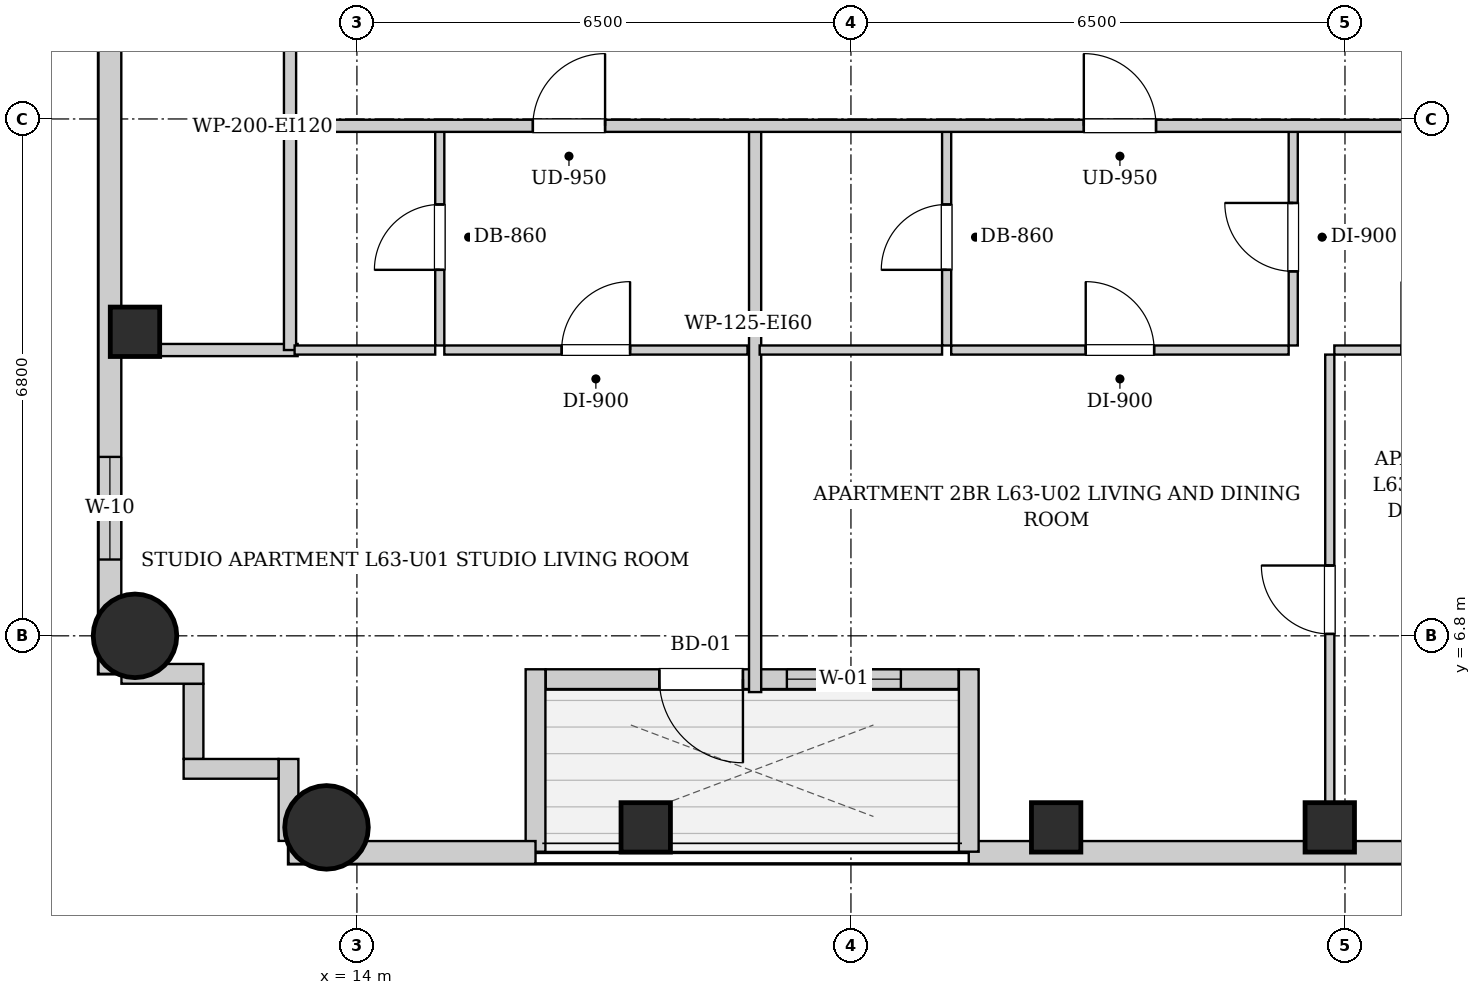
"""IFC4 building model, lengths in metres.
Left out: names, types, materials, properties, quantities, classifications, styles, units other than length and angle.
Written with IfcOpenShell. Run it as: python <this file> out.ifc"""

import sys

from ifc_helpers import new_model, si_unit, direction, frame, frame_2d, origin, origin_2d, place, context, subcontext, project, spatial, rectangle, circle, extrude, element, fill, save


model = new_model("IFC4")
c1 = context("Model", 3, precision=1e-05, world=origin(), true_north=direction((0.0, 1.0)))
c2 = subcontext(c1, "Body", "Model", "MODEL_VIEW")
j1 = project(units=[si_unit("LENGTHUNIT", "METRE"), si_unit("PLANEANGLEUNIT", "RADIAN")], contexts=[c1])
p1 = place(None, origin())
s1 = spatial("IfcSite", under=j1, at=p1, CompositionType="ELEMENT")
p2 = place(p1, origin())
s2 = spatial("IfcBuilding", under=s1, at=p2, CompositionType="ELEMENT")
p3 = place(p2, frame((0.0, 0.0, 217.3)))
s3 = spatial("IfcBuildingStorey", under=s2, at=p3, CompositionType="ELEMENT", Elevation=217.3)
p4 = place(p3, frame((13.6, 4.28, 0.0), z_axis=(0.0, 0.0, 1.0), x_axis=(1.0, 0.0, 0.0)))
e1 = element("IfcColumn", 1, at=p4, inside=s3, PredefinedType="COLUMN", context=c2, shape_type="SweptSolid", body=[
    extrude(circle(Radius=0.55, at=origin_2d()), origin(), (0.0, 0.0, 1.0), 3.4),
])
for number, where, z_axis, x_axis in (
    (2, (17.8, 4.28, 0.0), (0.0, 0.0, 1.0), (1.0, 0.0, 0.0)),
    (3, (23.2, 4.28, 0.0), (0.0, 0.0, 1.0), (1.0, 0.0, 0.0)),
    (4, (26.8, 4.28, 0.0), (0.0, 0.0, 1.0), (1.0, 0.0, 0.0)),
):
    element("IfcColumn", number, at=place(p3, frame(where, z_axis=z_axis, x_axis=x_axis)), inside=s3, PredefinedType="COLUMN", context=c2, shape_type="SweptSolid", body=[
        extrude(rectangle(XDim=0.65, YDim=0.65, at=origin_2d()), origin(), (0.0, 0.0, 1.0), 3.4),
    ])
p5 = place(p3, frame((11.08, 6.8, 0.0), z_axis=(0.0, 0.0, 1.0), x_axis=(1.0, 0.0, 0.0)))
e5 = element("IfcColumn", 5, at=p5, inside=s3, PredefinedType="COLUMN", context=c2, shape_type="SweptSolid", body=[
    extrude(circle(Radius=0.55, at=origin_2d()), origin(), (0.0, 0.0, 1.0), 3.4),
])
p6 = place(p3, frame((11.08, 10.8, 0.0), z_axis=(0.0, 0.0, 1.0), x_axis=(1.0, 0.0, 0.0)))
e6 = element("IfcColumn", 6, at=p6, inside=s3, PredefinedType="COLUMN", context=c2, shape_type="SweptSolid", body=[
    extrude(rectangle(XDim=0.65, YDim=0.65, at=origin_2d()), origin(), (0.0, 0.0, 1.0), 3.4),
])
p7 = place(p3, frame((37.8, 3.95, 0.0), z_axis=(0.0, 0.0, 1.0), x_axis=(-1.0, 0.0, 0.0)))
e7 = element("IfcWall", 7, at=p7, inside=s3, PredefinedType="SOLIDWALL", context=c2, shape_type="SweptSolid", body=[
    extrude(rectangle(XDim=15.75, YDim=0.3, at=frame_2d((7.875, 0.0))), origin(), (0.0, 0.0, 1.0), 3.14),
])
p8 = place(p7, frame((8.335, 0.0, 0.55)))
e8 = element("IfcOpeningElement", 8, at=p8, cuts=e7, PredefinedType="OPENING", context=c2, shape_type="SweptSolid", body=[
    extrude(rectangle(XDim=1.35, YDim=1.2, at=frame_2d((0.675, 0.6))), frame((0.0, 0.16, 0.0), z_axis=(0.0, -1.0, 0.0), x_axis=(1.0, 0.0, 0.0)), (0.0, 0.0, 1.0), 0.32),
])
p9 = place(p7, frame((5.085, 0.0, 0.55)))
e9 = element("IfcOpeningElement", 9, at=p9, cuts=e7, PredefinedType="OPENING", context=c2, shape_type="SweptSolid", body=[
    extrude(rectangle(XDim=1.35, YDim=1.2, at=frame_2d((0.675, 0.6))), frame((0.0, 0.16, 0.0), z_axis=(0.0, -1.0, 0.0), x_axis=(1.0, 0.0, 0.0)), (0.0, 0.0, 1.0), 0.32),
])
p10 = place(p3, frame((22.05, 3.96, 0.0), z_axis=(0.0, 0.0, 1.0), x_axis=(0.0, 1.0, 0.0)))
e10 = element("IfcWall", 10, at=p10, inside=s3, PredefinedType="SOLIDWALL", context=c2, shape_type="SweptSolid", body=[
    extrude(rectangle(XDim=2.4, YDim=0.26, at=frame_2d((1.2, 0.0))), origin(), (0.0, 0.0, 1.0), 3.14),
])
p11 = place(p3, frame((21.916, 6.23, 0.0), z_axis=(0.0, 0.0, 1.0), x_axis=(-1.0, 0.0, 0.0)))
e11 = element("IfcWall", 11, at=p11, inside=s3, PredefinedType="SOLIDWALL", context=c2, shape_type="SweptSolid", body=[
    extrude(rectangle(XDim=5.432, YDim=0.26, at=frame_2d((2.716, 0.0))), origin(), (0.0, 0.0, 1.0), 3.14),
])
p12 = place(p11, frame((2.837, 0.0, 0.0)))
e12 = element("IfcOpeningElement", 12, at=p12, cuts=e11, PredefinedType="OPENING", context=c2, shape_type="SweptSolid", body=[
    extrude(rectangle(XDim=1.1, YDim=2.0, at=frame_2d((0.55, 1.0))), frame((0.0, 0.14, 0.0), z_axis=(0.0, -1.0, 0.0), x_axis=(1.0, 0.0, 0.0)), (0.0, 0.0, 1.0), 0.28),
])
p13 = place(p11, frame((0.759, 0.0, 0.85)))
e13 = element("IfcOpeningElement", 13, at=p13, cuts=e11, PredefinedType="OPENING", context=c2, shape_type="SweptSolid", body=[
    extrude(rectangle(XDim=1.5, YDim=1.85, at=frame_2d((0.75, 0.925))), frame((0.0, 0.14, 0.0), z_axis=(0.0, -1.0, 0.0), x_axis=(1.0, 0.0, 0.0)), (0.0, 0.0, 1.0), 0.28),
])
p14 = place(p3, frame((16.35, 6.36, 0.0), z_axis=(0.0, 0.0, 1.0), x_axis=(0.0, -1.0, 0.0)))
e14 = element("IfcWall", 14, at=p14, inside=s3, PredefinedType="SOLIDWALL", context=c2, shape_type="SweptSolid", body=[
    extrude(rectangle(XDim=2.4, YDim=0.26, at=frame_2d((1.2, 0.0))), origin(), (0.0, 0.0, 1.0), 3.14),
])
p15 = place(p3, frame((16.35, 3.95, 0.0), z_axis=(0.0, 0.0, 1.0), x_axis=(-1.0, 0.0, 0.0)))
e15 = element("IfcWall", 15, at=p15, inside=s3, PredefinedType="SOLIDWALL", context=c2, shape_type="SweptSolid", body=[
    extrude(rectangle(XDim=3.25, YDim=0.3, at=frame_2d((1.625, 0.0))), origin(), (0.0, 0.0, 1.0), 3.14),
])
p16 = place(p3, frame((10.75, 6.3, 0.0), z_axis=(0.0, 0.0, 1.0), x_axis=(0.0, 1.0, 0.0)))
e16 = element("IfcWall", 16, at=p16, inside=s3, PredefinedType="SOLIDWALL", context=c2, shape_type="SweptSolid", body=[
    extrude(rectangle(XDim=31.4, YDim=0.3, at=frame_2d((15.7, 0.0))), origin(), (0.0, 0.0, 1.0), 3.14),
])
p17 = place(p16, frame((1.504, 0.0, 0.55)))
e17 = element("IfcOpeningElement", 17, at=p17, cuts=e16, PredefinedType="OPENING", context=c2, shape_type="SweptSolid", body=[
    extrude(rectangle(XDim=1.35, YDim=1.2, at=frame_2d((0.675, 0.6))), frame((0.0, 0.16, 0.0), z_axis=(0.0, -1.0, 0.0), x_axis=(1.0, 0.0, 0.0)), (0.0, 0.0, 1.0), 0.32),
])
p18 = place(p16, frame((28.546, 0.0, 0.55)))
e18 = element("IfcOpeningElement", 18, at=p18, cuts=e16, PredefinedType="OPENING", context=c2, shape_type="SweptSolid", body=[
    extrude(rectangle(XDim=1.35, YDim=1.2, at=frame_2d((0.675, 0.6))), frame((0.0, 0.16, 0.0), z_axis=(0.0, -1.0, 0.0), x_axis=(1.0, 0.0, 0.0)), (0.0, 0.0, 1.0), 0.32),
])
p19 = place(p16, frame((10.367, 0.0, 0.55)))
e19 = element("IfcOpeningElement", 19, at=p19, cuts=e16, PredefinedType="OPENING", context=c2, shape_type="SweptSolid", body=[
    extrude(rectangle(XDim=1.35, YDim=1.2, at=frame_2d((0.675, 0.6))), frame((0.0, 0.16, 0.0), z_axis=(0.0, -1.0, 0.0), x_axis=(1.0, 0.0, 0.0)), (0.0, 0.0, 1.0), 0.32),
])
p20 = place(p16, frame((19.683, 0.0, 0.55)))
e20 = element("IfcOpeningElement", 20, at=p20, cuts=e16, PredefinedType="OPENING", context=c2, shape_type="SweptSolid", body=[
    extrude(rectangle(XDim=1.35, YDim=1.2, at=frame_2d((0.675, 0.6))), frame((0.0, 0.16, 0.0), z_axis=(0.0, -1.0, 0.0), x_axis=(1.0, 0.0, 0.0)), (0.0, 0.0, 1.0), 0.32),
])
p21 = place(p3, frame((13.1, 4.102, 0.0), z_axis=(0.0, 0.0, 1.0), x_axis=(0.0, 1.0, 0.0)))
e21 = element("IfcWall", 21, at=p21, inside=s3, PredefinedType="SOLIDWALL", context=c2, shape_type="SweptSolid", body=[
    extrude(rectangle(XDim=1.078, YDim=0.26, at=frame_2d((0.539, 0.0))), origin(), (0.0, 0.0, 1.0), 3.14),
])
p22 = place(p3, frame((12.968, 5.05, 0.0), z_axis=(0.0, 0.0, 1.0), x_axis=(-1.0, 0.0, 0.0)))
e22 = element("IfcWall", 22, at=p22, inside=s3, PredefinedType="SOLIDWALL", context=c2, shape_type="SweptSolid", body=[
    extrude(rectangle(XDim=1.248, YDim=0.26, at=frame_2d((0.624, 0.0))), origin(), (0.0, 0.0, 1.0), 3.14),
])
p23 = place(p3, frame((11.85, 5.182, 0.0), z_axis=(0.0, 0.0, 1.0), x_axis=(0.0, 1.0, 0.0)))
e23 = element("IfcWall", 23, at=p23, inside=s3, PredefinedType="SOLIDWALL", context=c2, shape_type="SweptSolid", body=[
    extrude(rectangle(XDim=0.986, YDim=0.26, at=frame_2d((0.493, 0.0))), origin(), (0.0, 0.0, 1.0), 3.14),
])
p24 = place(p3, frame((11.98, 6.3, 0.0), z_axis=(0.0, 0.0, 1.0), x_axis=(-1.0, 0.0, 0.0)))
e24 = element("IfcWall", 24, at=p24, inside=s3, PredefinedType="SOLIDWALL", context=c2, shape_type="SweptSolid", body=[
    extrude(rectangle(XDim=1.078, YDim=0.26, at=frame_2d((0.539, 0.0))), origin(), (0.0, 0.0, 1.0), 3.14),
])
p25 = place(p3, frame((13.12, 13.51, 0.0), z_axis=(0.0, 0.0, 1.0), x_axis=(0.0, 1.0, 0.0)))
e25 = element("IfcWall", 25, at=p25, inside=s3, PredefinedType="PARTITIONING", context=c2, shape_type="SweptSolid", body=[
    extrude(rectangle(XDim=1.58, YDim=0.16, at=frame_2d((0.79, 0.0))), origin(), (0.0, 0.0, 1.0), 3.14),
])
p26 = place(p3, frame((10.88, 10.56, 0.0), z_axis=(0.0, 0.0, 1.0), x_axis=(1.0, 0.0, 0.0)))
e26 = element("IfcWall", 26, at=p26, inside=s3, PredefinedType="PARTITIONING", context=c2, shape_type="SweptSolid", body=[
    extrude(rectangle(XDim=2.34, YDim=0.16, at=frame_2d((1.17, 0.0))), origin(), (0.0, 0.0, 1.0), 3.14),
])
p27 = place(p3, frame((13.12, 10.56, 0.0), z_axis=(0.0, 0.0, 1.0), x_axis=(0.0, 1.0, 0.0)))
e27 = element("IfcWall", 27, at=p27, inside=s3, PredefinedType="PARTITIONING", context=c2, shape_type="SweptSolid", body=[
    extrude(rectangle(XDim=2.91, YDim=0.16, at=frame_2d((1.455, 0.0))), origin(), (0.0, 0.0, 1.0), 3.14),
])
p28 = place(p3, frame((15.09, 10.62, 0.0), z_axis=(0.0, 0.0, 1.0), x_axis=(0.0, 1.0, 0.0)))
e28 = element("IfcWall", 28, at=p28, inside=s3, PredefinedType="PARTITIONING", context=c2, shape_type="SweptSolid", body=[
    extrude(rectangle(XDim=2.85, YDim=0.12, at=frame_2d((1.425, 0.0))), origin(), (0.0, 0.0, 1.0), 3.14),
])
p29 = place(p28, frame((0.995, 0.0, 0.0)))
e29 = element("IfcOpeningElement", 29, at=p29, cuts=e28, PredefinedType="OPENING", context=c2, shape_type="SweptSolid", body=[
    extrude(rectangle(XDim=0.86, YDim=2.05, at=frame_2d((0.43, 1.025))), frame((0.0, 0.07, 0.0), z_axis=(0.0, -1.0, 0.0), x_axis=(1.0, 0.0, 0.0)), (0.0, 0.0, 1.0), 0.14),
])
p30 = place(p3, frame((13.18, 10.56, 0.0), z_axis=(0.0, 0.0, 1.0), x_axis=(1.0, 0.0, 0.0)))
e30 = element("IfcWall", 30, at=p30, inside=s3, PredefinedType="PARTITIONING", context=c2, shape_type="SweptSolid", body=[
    extrude(rectangle(XDim=1.85, YDim=0.12, at=frame_2d((0.925, 0.0))), origin(), (0.0, 0.0, 1.0), 3.14),
])
p31 = place(p3, frame((15.15, 10.56, 0.0), z_axis=(0.0, 0.0, 1.0), x_axis=(1.0, 0.0, 0.0)))
e31 = element("IfcWall", 31, at=p31, inside=s3, PredefinedType="PARTITIONING", context=c2, shape_type="SweptSolid", body=[
    extrude(rectangle(XDim=3.989, YDim=0.12, at=frame_2d((1.995, 0.0))), origin(), (0.0, 0.0, 1.0), 3.14),
])
p32 = place(p31, frame((1.544, 0.0, 0.0)))
e32 = element("IfcOpeningElement", 32, at=p32, cuts=e31, PredefinedType="OPENING", context=c2, shape_type="SweptSolid", body=[
    extrude(rectangle(XDim=0.9, YDim=2.05, at=frame_2d((0.45, 1.025))), frame((0.0, 0.07, 0.0), z_axis=(0.0, -1.0, 0.0), x_axis=(1.0, 0.0, 0.0)), (0.0, 0.0, 1.0), 0.14),
])
p33 = place(p3, frame((19.239, 6.06, 0.0), z_axis=(0.0, 0.0, 1.0), x_axis=(0.0, 1.0, 0.0)))
e33 = element("IfcWall", 33, at=p33, inside=s3, PredefinedType="PARTITIONING", context=c2, shape_type="SweptSolid", body=[
    extrude(rectangle(XDim=7.41, YDim=0.16, at=frame_2d((3.705, 0.0))), origin(), (0.0, 0.0, 1.0), 3.14),
])
p34 = place(p3, frame((21.759, 10.62, 0.0), z_axis=(0.0, 0.0, 1.0), x_axis=(0.0, 1.0, 0.0)))
e34 = element("IfcWall", 34, at=p34, inside=s3, PredefinedType="PARTITIONING", context=c2, shape_type="SweptSolid", body=[
    extrude(rectangle(XDim=2.85, YDim=0.12, at=frame_2d((1.425, 0.0))), origin(), (0.0, 0.0, 1.0), 3.14),
])
p35 = place(p34, frame((0.995, 0.0, 0.0)))
e35 = element("IfcOpeningElement", 35, at=p35, cuts=e34, PredefinedType="OPENING", context=c2, shape_type="SweptSolid", body=[
    extrude(rectangle(XDim=0.86, YDim=2.05, at=frame_2d((0.43, 1.025))), frame((0.0, 0.07, 0.0), z_axis=(0.0, -1.0, 0.0), x_axis=(1.0, 0.0, 0.0)), (0.0, 0.0, 1.0), 0.14),
])
p36 = place(p3, frame((19.299, 10.56, 0.0), z_axis=(0.0, 0.0, 1.0), x_axis=(1.0, 0.0, 0.0)))
e36 = element("IfcWall", 36, at=p36, inside=s3, PredefinedType="PARTITIONING", context=c2, shape_type="SweptSolid", body=[
    extrude(rectangle(XDim=2.4, YDim=0.12, at=frame_2d((1.2, 0.0))), origin(), (0.0, 0.0, 1.0), 3.14),
])
p37 = place(p3, frame((26.319, 10.62, 0.0), z_axis=(0.0, 0.0, 1.0), x_axis=(0.0, 1.0, 0.0)))
e37 = element("IfcWall", 37, at=p37, inside=s3, PredefinedType="PARTITIONING", context=c2, shape_type="SweptSolid", body=[
    extrude(rectangle(XDim=2.85, YDim=0.12, at=frame_2d((1.425, 0.0))), origin(), (0.0, 0.0, 1.0), 3.14),
])
p38 = place(p37, frame((0.975, 0.0, 0.0)))
e38 = element("IfcOpeningElement", 38, at=p38, cuts=e37, PredefinedType="OPENING", context=c2, shape_type="SweptSolid", body=[
    extrude(rectangle(XDim=0.9, YDim=2.05, at=frame_2d((0.45, 1.025))), frame((0.0, 0.07, 0.0), z_axis=(0.0, -1.0, 0.0), x_axis=(1.0, 0.0, 0.0)), (0.0, 0.0, 1.0), 0.14),
])
p39 = place(p3, frame((21.819, 10.56, 0.0), z_axis=(0.0, 0.0, 1.0), x_axis=(1.0, 0.0, 0.0)))
e39 = element("IfcWall", 39, at=p39, inside=s3, PredefinedType="PARTITIONING", context=c2, shape_type="SweptSolid", body=[
    extrude(rectangle(XDim=4.44, YDim=0.12, at=frame_2d((2.22, 0.0))), origin(), (0.0, 0.0, 1.0), 3.14),
])
p40 = place(p39, frame((1.77, 0.0, 0.0)))
e40 = element("IfcOpeningElement", 40, at=p40, cuts=e39, PredefinedType="OPENING", context=c2, shape_type="SweptSolid", body=[
    extrude(rectangle(XDim=0.9, YDim=2.05, at=frame_2d((0.45, 1.025))), frame((0.0, 0.07, 0.0), z_axis=(0.0, -1.0, 0.0), x_axis=(1.0, 0.0, 0.0)), (0.0, 0.0, 1.0), 0.14),
])
p41 = place(p3, frame((26.86, 10.56, 0.0), z_axis=(0.0, 0.0, 1.0), x_axis=(1.0, 0.0, 0.0)))
e41 = element("IfcWall", 41, at=p41, inside=s3, PredefinedType="PARTITIONING", context=c2, shape_type="SweptSolid", body=[
    extrude(rectangle(XDim=2.669, YDim=0.12, at=frame_2d((1.334, 0.0))), origin(), (0.0, 0.0, 1.0), 3.14),
])
p42 = place(p41, frame((0.884, 0.0, 0.0)))
e42 = element("IfcOpeningElement", 42, at=p42, cuts=e41, PredefinedType="OPENING", context=c2, shape_type="SweptSolid", body=[
    extrude(rectangle(XDim=0.9, YDim=2.05, at=frame_2d((0.45, 1.025))), frame((0.0, 0.07, 0.0), z_axis=(0.0, -1.0, 0.0), x_axis=(1.0, 0.0, 0.0)), (0.0, 0.0, 1.0), 0.14),
])
p43 = place(p3, frame((26.8, 4.08, 0.0), z_axis=(0.0, 0.0, 1.0), x_axis=(0.0, 1.0, 0.0)))
e43 = element("IfcWall", 43, at=p43, inside=s3, PredefinedType="PARTITIONING", context=c2, shape_type="SweptSolid", body=[
    extrude(rectangle(XDim=6.42, YDim=0.12, at=frame_2d((3.21, 0.0))), origin(), (0.0, 0.0, 1.0), 3.14),
])
p44 = place(p43, frame((2.745, 0.0, 0.0)))
e44 = element("IfcOpeningElement", 44, at=p44, cuts=e43, PredefinedType="OPENING", context=c2, shape_type="SweptSolid", body=[
    extrude(rectangle(XDim=0.9, YDim=2.05, at=frame_2d((0.45, 1.025))), frame((0.0, 0.07, 0.0), z_axis=(0.0, -1.0, 0.0), x_axis=(1.0, 0.0, 0.0)), (0.0, 0.0, 1.0), 0.14),
])
p45 = place(p3, frame((13.15, 13.51, 0.0), z_axis=(0.0, 0.0, 1.0), x_axis=(1.0, 0.0, 0.0)))
e45 = element("IfcWall", 45, at=p45, inside=s3, PredefinedType="PARTITIONING", context=c2, shape_type="SweptSolid", body=[
    extrude(rectangle(XDim=24.6, YDim=0.16, at=frame_2d((12.3, 0.0))), origin(), (0.0, 0.0, 1.0), 3.14),
])
p46 = place(p45, frame((3.165, 0.0, 0.0)))
e46 = element("IfcOpeningElement", 46, at=p46, cuts=e45, PredefinedType="OPENING", context=c2, shape_type="SweptSolid", body=[
    extrude(rectangle(XDim=0.95, YDim=2.1, at=frame_2d((0.475, 1.05))), frame((0.0, 0.09, 0.0), z_axis=(0.0, -1.0, 0.0), x_axis=(1.0, 0.0, 0.0)), (0.0, 0.0, 1.0), 0.18),
])
p47 = place(p45, frame((10.414, 0.0, 0.0)))
e47 = element("IfcOpeningElement", 47, at=p47, cuts=e45, PredefinedType="OPENING", context=c2, shape_type="SweptSolid", body=[
    extrude(rectangle(XDim=0.95, YDim=2.1, at=frame_2d((0.475, 1.05))), frame((0.0, 0.09, 0.0), z_axis=(0.0, -1.0, 0.0), x_axis=(1.0, 0.0, 0.0)), (0.0, 0.0, 1.0), 0.18),
])
p48 = place(p29, origin())
e48 = element("IfcDoor", 48, at=p48, inside=s3, OperationType="SINGLE_SWING_LEFT", PredefinedType="DOOR", context=c2, shape_type="SweptSolid", body=[
    extrude(rectangle(XDim=0.86, YDim=2.05, at=frame_2d((0.43, 1.025))), frame((0.0, 0.025, 0.0), z_axis=(0.0, -1.0, 0.0), x_axis=(1.0, 0.0, 0.0)), (0.0, 0.0, 1.0), 0.05),
])
fill(e29, e48)
p49 = place(p32, origin())
e49 = element("IfcDoor", 49, at=p49, inside=s3, OperationType="SINGLE_SWING_RIGHT", PredefinedType="DOOR", context=c2, shape_type="SweptSolid", body=[
    extrude(rectangle(XDim=0.9, YDim=2.05, at=frame_2d((0.45, 1.025))), frame((0.0, 0.025, 0.0), z_axis=(0.0, -1.0, 0.0), x_axis=(1.0, 0.0, 0.0)), (0.0, 0.0, 1.0), 0.05),
])
fill(e32, e49)
p50 = place(p35, origin())
e50 = element("IfcDoor", 50, at=p50, inside=s3, OperationType="SINGLE_SWING_LEFT", PredefinedType="DOOR", context=c2, shape_type="SweptSolid", body=[
    extrude(rectangle(XDim=0.86, YDim=2.05, at=frame_2d((0.43, 1.025))), frame((0.0, 0.025, 0.0), z_axis=(0.0, -1.0, 0.0), x_axis=(1.0, 0.0, 0.0)), (0.0, 0.0, 1.0), 0.05),
])
fill(e35, e50)
p51 = place(p38, origin())
e51 = element("IfcDoor", 51, at=p51, inside=s3, OperationType="SINGLE_SWING_RIGHT", PredefinedType="DOOR", context=c2, shape_type="SweptSolid", body=[
    extrude(rectangle(XDim=0.9, YDim=2.05, at=frame_2d((0.45, 1.025))), frame((0.0, 0.025, 0.0), z_axis=(0.0, -1.0, 0.0), x_axis=(1.0, 0.0, 0.0)), (0.0, 0.0, 1.0), 0.05),
])
fill(e38, e51)
p52 = place(p40, origin())
e52 = element("IfcDoor", 52, at=p52, inside=s3, OperationType="SINGLE_SWING_LEFT", PredefinedType="DOOR", context=c2, shape_type="SweptSolid", body=[
    extrude(rectangle(XDim=0.9, YDim=2.05, at=frame_2d((0.45, 1.025))), frame((0.0, 0.025, 0.0), z_axis=(0.0, -1.0, 0.0), x_axis=(1.0, 0.0, 0.0)), (0.0, 0.0, 1.0), 0.05),
])
fill(e40, e52)
p53 = place(p44, origin())
e53 = element("IfcDoor", 53, at=p53, inside=s3, OperationType="SINGLE_SWING_RIGHT", PredefinedType="DOOR", context=c2, shape_type="SweptSolid", body=[
    extrude(rectangle(XDim=0.9, YDim=2.05, at=frame_2d((0.45, 1.025))), frame((0.0, 0.025, 0.0), z_axis=(0.0, -1.0, 0.0), x_axis=(1.0, 0.0, 0.0)), (0.0, 0.0, 1.0), 0.05),
])
fill(e44, e53)
p54 = place(p46, origin())
e54 = element("IfcDoor", 54, at=p54, inside=s3, OperationType="SINGLE_SWING_RIGHT", PredefinedType="DOOR", context=c2, shape_type="SweptSolid", body=[
    extrude(rectangle(XDim=0.95, YDim=2.1, at=frame_2d((0.475, 1.05))), frame((0.0, 0.025, 0.0), z_axis=(0.0, -1.0, 0.0), x_axis=(1.0, 0.0, 0.0)), (0.0, 0.0, 1.0), 0.05),
])
fill(e46, e54)
p55 = place(p47, origin())
e55 = element("IfcDoor", 55, at=p55, inside=s3, OperationType="SINGLE_SWING_LEFT", PredefinedType="DOOR", context=c2, shape_type="SweptSolid", body=[
    extrude(rectangle(XDim=0.95, YDim=2.1, at=frame_2d((0.475, 1.05))), frame((0.0, 0.025, 0.0), z_axis=(0.0, -1.0, 0.0), x_axis=(1.0, 0.0, 0.0)), (0.0, 0.0, 1.0), 0.05),
])
fill(e47, e55)
p56 = place(p12, origin())
e56 = element("IfcDoor", 56, at=p56, inside=s3, OperationType="SINGLE_SWING_LEFT", PredefinedType="DOOR", context=c2, shape_type="SweptSolid", body=[
    extrude(rectangle(XDim=1.1, YDim=2.0, at=frame_2d((0.55, 1.0))), frame((0.0, 0.025, 0.0), z_axis=(0.0, -1.0, 0.0), x_axis=(1.0, 0.0, 0.0)), (0.0, 0.0, 1.0), 0.05),
])
fill(e12, e56)
p57 = place(p17, origin())
e57 = element("IfcWindow", 57, at=p57, inside=s3, PartitioningType="SINGLE_PANEL", PredefinedType="WINDOW", context=c2, shape_type="SweptSolid", body=[
    extrude(rectangle(XDim=1.35, YDim=1.2, at=frame_2d((0.675, 0.6))), frame((0.0, 0.03, 0.0), z_axis=(0.0, -1.0, 0.0), x_axis=(1.0, 0.0, 0.0)), (0.0, 0.0, 1.0), 0.06),
])
fill(e17, e57)
p58 = place(p13, origin())
e58 = element("IfcWindow", 58, at=p58, inside=s3, PartitioningType="SINGLE_PANEL", PredefinedType="WINDOW", context=c2, shape_type="SweptSolid", body=[
    extrude(rectangle(XDim=1.5, YDim=1.85, at=frame_2d((0.75, 0.925))), frame((0.0, 0.03, 0.0), z_axis=(0.0, -1.0, 0.0), x_axis=(1.0, 0.0, 0.0)), (0.0, 0.0, 1.0), 0.06),
])
fill(e13, e58)
save(model, sys.argv[1])
